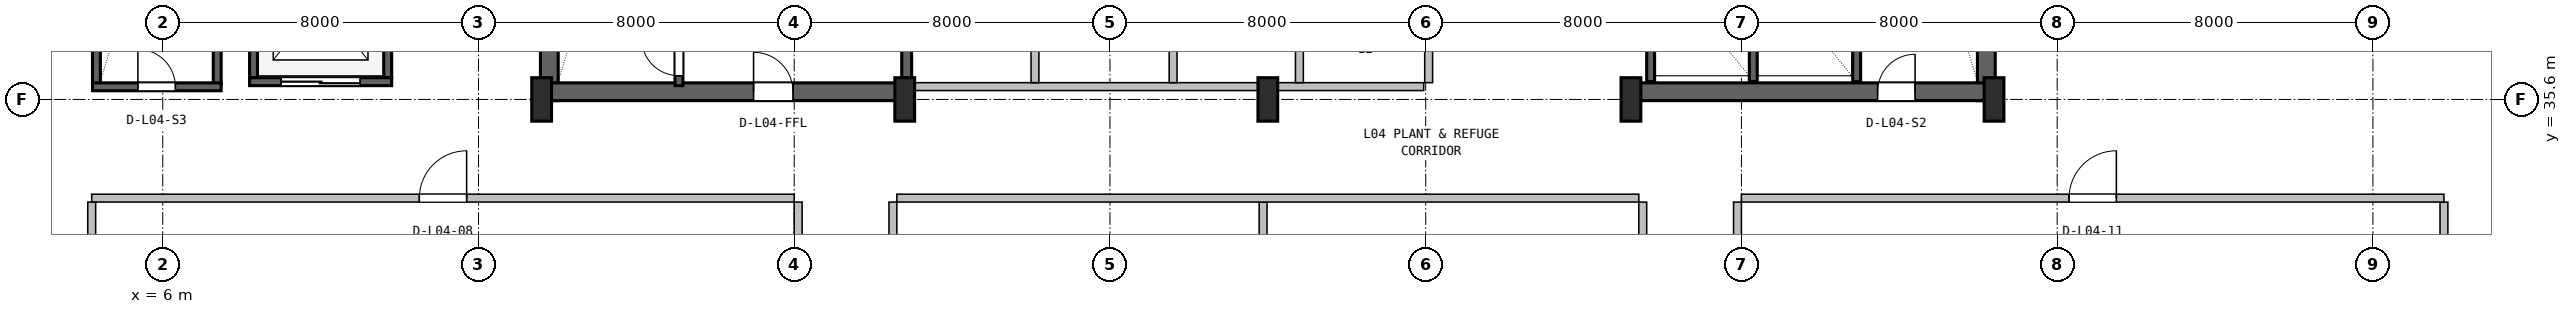
"""IFC4 building model, lengths in metres.
Left out: names, types, materials, properties, quantities, classifications, styles, units other than length and angle.
Written with IfcOpenShell. Run it as: python <this file> out.ifc"""

import sys

from ifc_helpers import new_model, si_unit, direction, frame, frame_2d, origin, origin_2d, place, context, subcontext, project, spatial, rectangle, i_section, extrude, source, transform, mapped, element, fill, save


model = new_model("IFC4")
c1 = context("Model", 3, precision=1e-05, world=origin(), true_north=direction((0.0, 1.0)))
c2 = subcontext(c1, "Body", "Model", "MODEL_VIEW")
j1 = project(units=[si_unit("LENGTHUNIT", "METRE"), si_unit("PLANEANGLEUNIT", "RADIAN")], contexts=[c1])
p1 = place(None, origin())
s1 = spatial("IfcSite", under=j1, at=p1, CompositionType="ELEMENT")
p2 = place(p1, origin())
s2 = spatial("IfcBuilding", under=s1, at=p2, CompositionType="ELEMENT")
p3 = place(p2, frame((0.0, 0.0, 22.2)))
s3 = spatial("IfcBuildingStorey", under=s2, at=p3, CompositionType="ELEMENT", Elevation=22.2)
for number, where, z_axis, x_axis in (
    (1, (15.795, 35.57, 0.0), (0.0, 0.0, 1.0), (0.0, 1.0, 0.0)),
    (2, (52.205, 35.57, 0.0), (0.0, 0.0, 1.0), (0.0, 1.0, 0.0)),
):
    element("IfcWall", number, at=place(p3, frame(where, z_axis=z_axis, x_axis=x_axis)), inside=s3, PredefinedType="SHEAR", context=c2, shape_type="SweptSolid", body=[
        extrude(rectangle(XDim=11.23, YDim=0.45, at=frame_2d((5.615, 0.0))), origin(), (0.0, 0.0, 1.0), 5.08),
    ])
p4 = place(p3, frame((15.57, 35.795, 0.0), z_axis=(0.0, 0.0, 1.0), x_axis=(1.0, 0.0, 0.0)))
e3 = element("IfcWall", 3, at=p4, inside=s3, PredefinedType="SHEAR", context=c2, shape_type="SweptSolid", body=[
    extrude(rectangle(XDim=9.23, YDim=0.45, at=frame_2d((4.615, 0.0))), origin(), (0.0, 0.0, 1.0), 5.08),
])
p5 = place(p4, frame((5.4, 0.0, 0.0)))
e4 = element("IfcOpeningElement", 4, at=p5, cuts=e3, PredefinedType="OPENING", context=c2, shape_type="SweptSolid", body=[
    extrude(rectangle(XDim=1.0, YDim=2.1, at=frame_2d((0.5, 1.05))), frame((0.0, 0.235, 0.0), z_axis=(0.0, -1.0, 0.0), x_axis=(1.0, 0.0, 0.0)), (0.0, 0.0, 1.0), 0.47),
])
p6 = place(p3, frame((43.2, 35.795, 0.0), z_axis=(0.0, 0.0, 1.0), x_axis=(1.0, 0.0, 0.0)))
e5 = element("IfcWall", 5, at=p6, inside=s3, PredefinedType="SHEAR", context=c2, shape_type="SweptSolid", body=[
    extrude(rectangle(XDim=9.23, YDim=0.45, at=frame_2d((4.615, 0.0))), origin(), (0.0, 0.0, 1.0), 5.08),
])
p7 = place(p6, frame((6.25, 0.0, 0.0)))
e6 = element("IfcOpeningElement", 6, at=p7, cuts=e5, PredefinedType="OPENING", context=c2, shape_type="SweptSolid", body=[
    extrude(rectangle(XDim=0.95, YDim=2.1, at=frame_2d((0.475, 1.05))), frame((0.0, 0.235, 0.0), z_axis=(0.0, -1.0, 0.0), x_axis=(1.0, 0.0, 0.0)), (0.0, 0.0, 1.0), 0.47),
])
m1 = source(origin(), c2, "Body", "SweptSolid", [
    extrude(i_section(OverallWidth=0.5, OverallDepth=1.1, WebThickness=0.018, FlangeThickness=0.032, FilletRadius=0.018, at=origin_2d()), origin(), (0.0, 0.0, 1.0), 5.4),
])
for number, where, z_axis, x_axis in (
    (7, (15.6, 35.6, 0.0), (0.0, 0.0, 1.0), (1.0, 0.0, 0.0)),
    (8, (24.8, 35.6, 0.0), (0.0, 0.0, 1.0), (1.0, 0.0, 0.0)),
    (9, (34.0, 35.6, 0.0), (0.0, 0.0, 1.0), (1.0, 0.0, 0.0)),
    (10, (43.2, 35.6, 0.0), (0.0, 0.0, 1.0), (1.0, 0.0, 0.0)),
    (11, (52.4, 35.6, 0.0), (0.0, 0.0, 1.0), (1.0, 0.0, 0.0)),
):
    element("IfcColumn", number, at=place(p3, frame(where, z_axis=z_axis, x_axis=x_axis)), inside=s3, PredefinedType="COLUMN", context=c2, shape_type="MappedRepresentation", body=[
        mapped(m1, transform((0.0, 0.0, 0.0), x_axis=(1.0, 0.0, 0.0), y_axis=(0.0, 1.0, 0.0), z_axis=(0.0, 0.0, 1.0), scale=1.0)),
    ])
p8 = place(p3, frame((19.08, 35.95, 0.0), z_axis=(0.0, 0.0, 1.0), x_axis=(0.0, 1.0, 0.0)))
e12 = element("IfcWall", 12, at=p8, inside=s3, PredefinedType="SHEAR", context=c2, shape_type="SweptSolid", body=[
    extrude(rectangle(XDim=9.65, YDim=0.2, at=frame_2d((4.825, 0.0))), origin(), (0.0, 0.0, 1.0), 5.08),
])
p9 = place(p8, frame((0.25, 0.0, 0.0)))
e13 = element("IfcOpeningElement", 13, at=p9, cuts=e12, PredefinedType="OPENING", context=c2, shape_type="SweptSolid", body=[
    extrude(rectangle(XDim=0.95, YDim=2.1, at=frame_2d((0.475, 1.05))), frame((0.0, 0.11, 0.0), z_axis=(0.0, -1.0, 0.0), x_axis=(1.0, 0.0, 0.0)), (0.0, 0.0, 1.0), 0.22),
])
p10 = place(p3, frame((24.85, 36.05, 0.0), z_axis=(0.0, 0.0, 1.0), x_axis=(0.0, 1.0, 0.0)))
e14 = element("IfcWall", 14, at=p10, inside=s3, PredefinedType="SHEAR", context=c2, shape_type="SweptSolid", body=[
    extrude(rectangle(XDim=10.45, YDim=0.25, at=frame_2d((5.225, 0.0))), origin(), (0.0, 0.0, 1.0), 5.08),
])
p11 = place(p3, frame((48.92, 36.05, 0.0), z_axis=(0.0, 0.0, 1.0), x_axis=(0.0, 1.0, 0.0)))
e15 = element("IfcWall", 15, at=p11, inside=s3, PredefinedType="SHEAR", context=c2, shape_type="SweptSolid", body=[
    extrude(rectangle(XDim=10.5, YDim=0.2, at=frame_2d((5.25, 0.0))), origin(), (0.0, 0.0, 1.0), 5.08),
])
for number, where, z_axis, x_axis in (
    (16, (43.7, 36.05, 0.0), (0.0, 0.0, 1.0), (0.0, 1.0, 0.0)),
    (17, (46.3, 36.05, 0.0), (0.0, 0.0, 1.0), (0.0, 1.0, 0.0)),
):
    element("IfcWall", number, at=place(p3, frame(where, z_axis=z_axis, x_axis=x_axis)), inside=s3, PredefinedType="SHEAR", context=c2, shape_type="SweptSolid", body=[
        extrude(rectangle(XDim=3.05, YDim=0.2, at=frame_2d((1.525, 0.0))), origin(), (0.0, 0.0, 1.0), 5.08),
    ])
for number, where, z_axis, x_axis in (
    (18, (4.32, 36.0, 0.0), (0.0, 0.0, 1.0), (0.0, 1.0, 0.0)),
    (19, (7.38, 36.0, 0.0), (0.0, 0.0, 1.0), (0.0, 1.0, 0.0)),
):
    element("IfcWall", number, at=place(p3, frame(where, z_axis=z_axis, x_axis=x_axis)), inside=s3, PredefinedType="SHEAR", context=c2, shape_type="SweptSolid", body=[
        extrude(rectangle(XDim=9.6, YDim=0.2, at=frame_2d((4.8, 0.0))), origin(), (0.0, 0.0, 1.0), 5.08),
    ])
p12 = place(p3, frame((4.22, 35.92, 0.0), z_axis=(0.0, 0.0, 1.0), x_axis=(1.0, 0.0, 0.0)))
e20 = element("IfcWall", 20, at=p12, inside=s3, PredefinedType="SHEAR", context=c2, shape_type="SweptSolid", body=[
    extrude(rectangle(XDim=3.26, YDim=0.2, at=frame_2d((1.63, 0.0))), origin(), (0.0, 0.0, 1.0), 5.08),
])
p13 = place(p12, frame((1.15, 0.0, 0.0)))
e21 = element("IfcOpeningElement", 21, at=p13, cuts=e20, PredefinedType="OPENING", context=c2, shape_type="SweptSolid", body=[
    extrude(rectangle(XDim=0.95, YDim=2.1, at=frame_2d((0.475, 1.05))), frame((0.0, 0.11, 0.0), z_axis=(0.0, -1.0, 0.0), x_axis=(1.0, 0.0, 0.0)), (0.0, 0.0, 1.0), 0.22),
])
for number, where, z_axis, x_axis in (
    (22, (8.3, 36.15, 0.0), (0.0, 0.0, 1.0), (0.0, 1.0, 0.0)),
    (23, (11.7, 36.15, 0.0), (0.0, 0.0, 1.0), (0.0, 1.0, 0.0)),
):
    element("IfcWall", number, at=place(p3, frame(where, z_axis=z_axis, x_axis=x_axis)), inside=s3, PredefinedType="SHEAR", context=c2, shape_type="SweptSolid", body=[
        extrude(rectangle(XDim=3.85, YDim=0.2, at=frame_2d((1.925, 0.0))), origin(), (0.0, 0.0, 1.0), 5.08),
    ])
p14 = place(p3, frame((8.2, 36.05, 0.0), z_axis=(0.0, 0.0, 1.0), x_axis=(1.0, 0.0, 0.0)))
e24 = element("IfcWall", 24, at=p14, inside=s3, PredefinedType="SHEAR", context=c2, shape_type="SweptSolid", body=[
    extrude(rectangle(XDim=3.6, YDim=0.2, at=frame_2d((1.8, 0.0))), origin(), (0.0, 0.0, 1.0), 5.08),
])
p15 = place(p14, frame((0.8, 0.0, 0.0)))
e25 = element("IfcOpeningElement", 25, at=p15, cuts=e24, PredefinedType="OPENING", context=c2, shape_type="SweptSolid", body=[
    extrude(rectangle(XDim=2.0, YDim=2.28, at=frame_2d((1.0, 1.14))), frame((0.0, 0.11, 0.0), z_axis=(0.0, -1.0, 0.0), x_axis=(1.0, 0.0, 0.0)), (0.0, 0.0, 1.0), 0.22),
])
p16 = place(p3, frame((25.0, 35.925, 0.0), z_axis=(0.0, 0.0, 1.0), x_axis=(1.0, 0.0, 0.0)))
e26 = element("IfcWall", 26, at=p16, inside=s3, PredefinedType="SOLIDWALL", context=c2, shape_type="SweptSolid", body=[
    extrude(rectangle(XDim=12.95, YDim=0.2, at=frame_2d((6.475, 0.0))), origin(), (0.0, 0.0, 1.0), 3.855),
])
for number, where, z_axis, x_axis in (
    (27, (28.1, 36.025, 0.0), (0.0, 0.0, 1.0), (0.0, 1.0, 0.0)),
    (28, (31.6, 36.025, 0.0), (0.0, 0.0, 1.0), (0.0, 1.0, 0.0)),
    (29, (34.8, 36.025, 0.0), (0.0, 0.0, 1.0), (0.0, 1.0, 0.0)),
    (30, (38.075, 36.025, 0.0), (0.0, 0.0, 1.0), (0.0, 1.0, 0.0)),
):
    element("IfcWall", number, at=place(p3, frame(where, z_axis=z_axis, x_axis=x_axis)), inside=s3, PredefinedType="SOLIDWALL", context=c2, shape_type="SweptSolid", body=[
        extrude(rectangle(XDim=3.125, YDim=0.2, at=frame_2d((1.562, 0.0))), origin(), (0.0, 0.0, 1.0), 5.06),
    ])
p17 = place(p3, frame((33.88, 22.22, 0.0), z_axis=(0.0, 0.0, 1.0), x_axis=(0.0, 1.0, 0.0)))
e31 = element("IfcWall", 31, at=p17, inside=s3, PredefinedType="SOLIDWALL", context=c2, shape_type="SweptSolid", body=[
    extrude(rectangle(XDim=10.78, YDim=0.2, at=frame_2d((5.39, 0.0))), origin(), (0.0, 0.0, 1.0), 3.725),
])
p18 = place(p3, frame((24.6, 33.1, 0.0), z_axis=(0.0, 0.0, 1.0), x_axis=(1.0, 0.0, 0.0)))
e32 = element("IfcWall", 32, at=p18, inside=s3, PredefinedType="SOLIDWALL", context=c2, shape_type="SweptSolid", body=[
    extrude(rectangle(XDim=18.8, YDim=0.2, at=frame_2d((9.4, 0.0))), origin(), (0.0, 0.0, 1.0), 3.855),
])
p19 = place(p3, frame((24.5, 4.7, 0.0), z_axis=(0.0, 0.0, 1.0), x_axis=(0.0, 1.0, 0.0)))
e33 = element("IfcWall", 33, at=p19, inside=s3, PredefinedType="SOLIDWALL", context=c2, shape_type="SweptSolid", body=[
    extrude(rectangle(XDim=28.3, YDim=0.2, at=frame_2d((14.15, 0.0))), origin(), (0.0, 0.0, 1.0), 3.725),
])
p20 = place(p19, frame((22.26, 0.0, 0.0)))
e34 = element("IfcOpeningElement", 34, at=p20, cuts=e33, PredefinedType="OPENING", context=c2, shape_type="SweptSolid", body=[
    extrude(rectangle(XDim=1.2, YDim=2.1, at=frame_2d((0.6, 1.05))), frame((0.0, 0.11, 0.0), z_axis=(0.0, -1.0, 0.0), x_axis=(1.0, 0.0, 0.0)), (0.0, 0.0, 1.0), 0.22),
])
p21 = place(p3, frame((43.5, 4.7, 0.0), z_axis=(0.0, 0.0, 1.0), x_axis=(0.0, 1.0, 0.0)))
e35 = element("IfcWall", 35, at=p21, inside=s3, PredefinedType="SOLIDWALL", context=c2, shape_type="SweptSolid", body=[
    extrude(rectangle(XDim=28.3, YDim=0.2, at=frame_2d((14.15, 0.0))), origin(), (0.0, 0.0, 1.0), 3.725),
])
p22 = place(p21, frame((22.26, 0.0, 0.0)))
e36 = element("IfcOpeningElement", 36, at=p22, cuts=e35, PredefinedType="OPENING", context=c2, shape_type="SweptSolid", body=[
    extrude(rectangle(XDim=1.2, YDim=2.1, at=frame_2d((0.6, 1.05))), frame((0.0, 0.11, 0.0), z_axis=(0.0, -1.0, 0.0), x_axis=(1.0, 0.0, 0.0)), (0.0, 0.0, 1.0), 0.22),
])
p23 = place(p21, frame((7.99, 0.0, 0.0)))
e37 = element("IfcOpeningElement", 37, at=p23, cuts=e35, PredefinedType="OPENING", context=c2, shape_type="SweptSolid", body=[
    extrude(rectangle(XDim=1.2, YDim=2.1, at=frame_2d((0.6, 1.05))), frame((0.0, 0.11, 0.0), z_axis=(0.0, -1.0, 0.0), x_axis=(1.0, 0.0, 0.0)), (0.0, 0.0, 1.0), 0.22),
])
p24 = place(p3, frame((22.1, 28.95, 0.0), z_axis=(0.0, 0.0, 1.0), x_axis=(0.0, 1.0, 0.0)))
e38 = element("IfcWall", 38, at=p24, inside=s3, PredefinedType="SOLIDWALL", context=c2, shape_type="SweptSolid", body=[
    extrude(rectangle(XDim=4.05, YDim=0.2, at=frame_2d((2.025, 0.0))), origin(), (0.0, 0.0, 1.0), 3.855),
])
p25 = place(p3, frame((4.2, 33.1, 0.0), z_axis=(0.0, 0.0, 1.0), x_axis=(1.0, 0.0, 0.0)))
e39 = element("IfcWall", 39, at=p25, inside=s3, PredefinedType="SOLIDWALL", context=c2, shape_type="SweptSolid", body=[
    extrude(rectangle(XDim=17.8, YDim=0.2, at=frame_2d((8.9, 0.0))), origin(), (0.0, 0.0, 1.0), 5.06),
])
p26 = place(p25, frame((8.3, 0.0, 0.0)))
e40 = element("IfcOpeningElement", 40, at=p26, cuts=e39, PredefinedType="OPENING", context=c2, shape_type="SweptSolid", body=[
    extrude(rectangle(XDim=1.2, YDim=2.1, at=frame_2d((0.6, 1.05))), frame((0.0, 0.11, 0.0), z_axis=(0.0, -1.0, 0.0), x_axis=(1.0, 0.0, 0.0)), (0.0, 0.0, 1.0), 0.22),
])
for number, where, z_axis, x_axis in (
    (41, (4.2, 28.95, 0.0), (0.0, 0.0, 1.0), (0.0, 1.0, 0.0)),
    (42, (63.8, 28.95, 0.0), (0.0, 0.0, 1.0), (0.0, 1.0, 0.0)),
):
    element("IfcWall", number, at=place(p3, frame(where, z_axis=z_axis, x_axis=x_axis)), inside=s3, PredefinedType="SOLIDWALL", context=c2, shape_type="SweptSolid", body=[
        extrude(rectangle(XDim=4.05, YDim=0.2, at=frame_2d((2.025, 0.0))), origin(), (0.0, 0.0, 1.0), 5.06),
    ])
p27 = place(p3, frame((46.0, 33.1, 0.0), z_axis=(0.0, 0.0, 1.0), x_axis=(1.0, 0.0, 0.0)))
e43 = element("IfcWall", 43, at=p27, inside=s3, PredefinedType="SOLIDWALL", context=c2, shape_type="SweptSolid", body=[
    extrude(rectangle(XDim=17.8, YDim=0.2, at=frame_2d((8.9, 0.0))), origin(), (0.0, 0.0, 1.0), 5.06),
])
p28 = place(p27, frame((8.3, 0.0, 0.0)))
e44 = element("IfcOpeningElement", 44, at=p28, cuts=e43, PredefinedType="OPENING", context=c2, shape_type="SweptSolid", body=[
    extrude(rectangle(XDim=1.2, YDim=2.1, at=frame_2d((0.6, 1.05))), frame((0.0, 0.11, 0.0), z_axis=(0.0, -1.0, 0.0), x_axis=(1.0, 0.0, 0.0)), (0.0, 0.0, 1.0), 0.22),
])
p29 = place(p3, frame((45.9, 28.95, 0.0), z_axis=(0.0, 0.0, 1.0), x_axis=(0.0, 1.0, 0.0)))
e45 = element("IfcWall", 45, at=p29, inside=s3, PredefinedType="SOLIDWALL", context=c2, shape_type="SweptSolid", body=[
    extrude(rectangle(XDim=4.05, YDim=0.2, at=frame_2d((2.025, 0.0))), origin(), (0.0, 0.0, 1.0), 3.855),
])
m2 = source(origin(), c2, "Body", "SweptSolid", [
    extrude(rectangle(XDim=0.95, YDim=2.1, at=frame_2d((0.475, 1.05))), frame((0.0, 0.025, 0.0), z_axis=(0.0, -1.0, 0.0), x_axis=(1.0, 0.0, 0.0)), (0.0, 0.0, 1.0), 0.05),
])
p30 = place(p9, origin())
e46 = element("IfcDoor", 46, at=p30, inside=s3, OperationType="SINGLE_SWING_RIGHT", PredefinedType="DOOR", context=c2, shape_type="MappedRepresentation", body=[
    mapped(m2, transform((0.0, 0.0, 0.0), x_axis=(1.0, 0.0, 0.0), y_axis=(0.0, 1.0, 0.0), z_axis=(0.0, 0.0, 1.0), scale=1.0)),
])
fill(e13, e46)
m3 = source(origin(), c2, "Body", "SweptSolid", [
    extrude(rectangle(XDim=1.0, YDim=2.1, at=frame_2d((0.5, 1.05))), frame((0.0, 0.025, 0.0), z_axis=(0.0, -1.0, 0.0), x_axis=(1.0, 0.0, 0.0)), (0.0, 0.0, 1.0), 0.05),
])
p31 = place(p5, origin())
e47 = element("IfcDoor", 47, at=p31, inside=s3, OperationType="SINGLE_SWING_LEFT", PredefinedType="DOOR", context=c2, shape_type="MappedRepresentation", body=[
    mapped(m3, transform((0.0, 0.0, 0.0), x_axis=(1.0, 0.0, 0.0), y_axis=(0.0, 1.0, 0.0), z_axis=(0.0, 0.0, 1.0), scale=1.0)),
])
fill(e4, e47)
p32 = place(p7, origin())
e48 = element("IfcDoor", 48, at=p32, inside=s3, OperationType="SINGLE_SWING_RIGHT", PredefinedType="DOOR", context=c2, shape_type="MappedRepresentation", body=[
    mapped(m2, transform((0.0, 0.0, 0.0), x_axis=(1.0, 0.0, 0.0), y_axis=(0.0, 1.0, 0.0), z_axis=(0.0, 0.0, 1.0), scale=1.0)),
])
fill(e6, e48)
p33 = place(p13, origin())
e49 = element("IfcDoor", 49, at=p33, inside=s3, OperationType="SINGLE_SWING_LEFT", PredefinedType="DOOR", context=c2, shape_type="MappedRepresentation", body=[
    mapped(m2, transform((0.0, 0.0, 0.0), x_axis=(1.0, 0.0, 0.0), y_axis=(0.0, 1.0, 0.0), z_axis=(0.0, 0.0, 1.0), scale=1.0)),
])
fill(e21, e49)
m4 = source(origin(), c2, "Body", "SweptSolid", [
    extrude(rectangle(XDim=2.0, YDim=2.28, at=frame_2d((1.0, 1.14))), frame((0.0, 0.025, 0.0), z_axis=(0.0, -1.0, 0.0), x_axis=(1.0, 0.0, 0.0)), (0.0, 0.0, 1.0), 0.05),
])
p34 = place(p15, frame((2.0, 0.0, 0.0), z_axis=(0.0, 0.0, 1.0), x_axis=(-1.0, 0.0, 0.0)))
e50 = element("IfcDoor", 50, at=p34, inside=s3, OperationType="DOUBLE_DOOR_SLIDING", PredefinedType="DOOR", context=c2, shape_type="MappedRepresentation", body=[
    mapped(m4, transform((0.0, 0.0, 0.0), x_axis=(1.0, 0.0, 0.0), y_axis=(0.0, 1.0, 0.0), z_axis=(0.0, 0.0, 1.0), scale=1.0)),
])
fill(e25, e50)
m5 = source(origin(), c2, "Body", "SweptSolid", [
    extrude(rectangle(XDim=1.2, YDim=2.1, at=frame_2d((0.6, 1.05))), frame((0.0, 0.025, 0.0), z_axis=(0.0, -1.0, 0.0), x_axis=(1.0, 0.0, 0.0)), (0.0, 0.0, 1.0), 0.05),
])
p35 = place(p26, origin())
e51 = element("IfcDoor", 51, at=p35, inside=s3, OperationType="SINGLE_SWING_RIGHT", PredefinedType="DOOR", context=c2, shape_type="MappedRepresentation", body=[
    mapped(m5, transform((0.0, 0.0, 0.0), x_axis=(1.0, 0.0, 0.0), y_axis=(0.0, 1.0, 0.0), z_axis=(0.0, 0.0, 1.0), scale=1.0)),
])
fill(e40, e51)
p36 = place(p28, origin())
e52 = element("IfcDoor", 52, at=p36, inside=s3, OperationType="SINGLE_SWING_RIGHT", PredefinedType="DOOR", context=c2, shape_type="MappedRepresentation", body=[
    mapped(m5, transform((0.0, 0.0, 0.0), x_axis=(1.0, 0.0, 0.0), y_axis=(0.0, 1.0, 0.0), z_axis=(0.0, 0.0, 1.0), scale=1.0)),
])
fill(e44, e52)
save(model, sys.argv[1])
